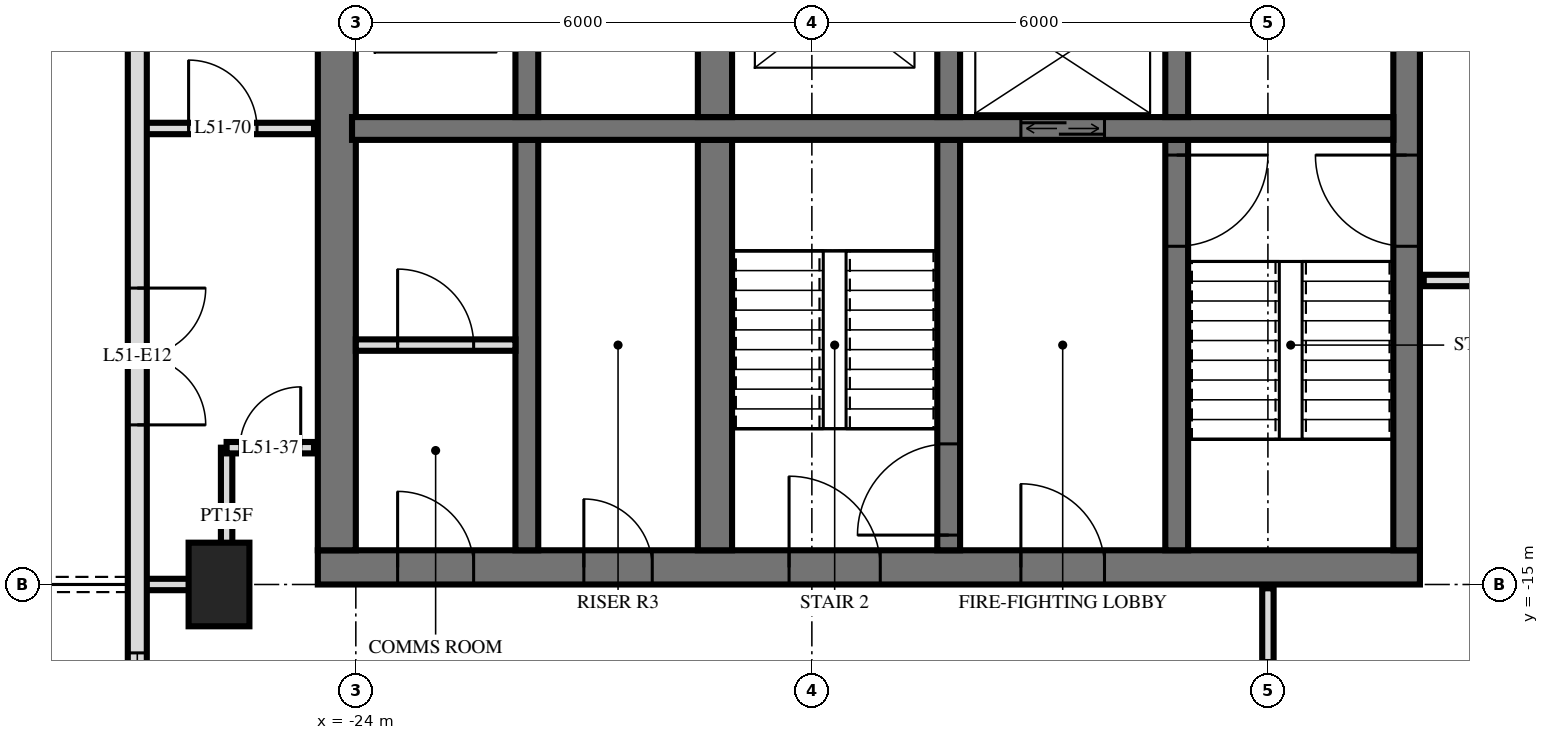
"""IFC4 building model, lengths in metres.
Left out: names, types, materials, properties, quantities, classifications, styles, units other than length and angle.
Written with IfcOpenShell. Run it as: python <this file> out.ifc"""

import sys

from ifc_helpers import new_model, si_unit, direction, frame, frame_2d, origin, origin_2d, place, context, subcontext, project, spatial, rectangle, extrude, element, fill, save


model = new_model("IFC4")
c1 = context("Model", 3, precision=1e-05, world=origin(), true_north=direction((0.0, 1.0)))
c2 = subcontext(c1, "Body", "Model", "MODEL_VIEW")
j1 = project(units=[si_unit("LENGTHUNIT", "METRE"), si_unit("PLANEANGLEUNIT", "RADIAN")], contexts=[c1])
p1 = place(None, origin())
s1 = spatial("IfcSite", under=j1, at=p1, CompositionType="ELEMENT")
p2 = place(p1, origin())
s2 = spatial("IfcBuilding", under=s1, at=p2, CompositionType="ELEMENT")
p3 = place(p2, frame((0.0, 0.0, 197.6)))
s3 = spatial("IfcBuildingStorey", under=s2, at=p3, CompositionType="ELEMENT", Elevation=197.6)
p4 = place(p3, frame((-25.8, -15.0, 0.0), z_axis=(0.0, 0.0, 1.0), x_axis=(0.0, 1.0, 0.0)))
e1 = element("IfcColumn", 1, at=p4, inside=s3, PredefinedType="COLUMN", context=c2, shape_type="SweptSolid", body=[
    extrude(rectangle(XDim=1.1, YDim=0.8, at=origin_2d()), origin(), (0.0, 0.0, 1.0), 3.5),
])
p5 = place(p3, frame((-24.5, -14.775, 0.0), z_axis=(0.0, 0.0, 1.0), x_axis=(1.0, 0.0, 0.0)))
e2 = element("IfcWall", 2, at=p5, inside=s3, PredefinedType="SHEAR", context=c2, shape_type="SweptSolid", body=[
    extrude(rectangle(XDim=14.5, YDim=0.45, at=frame_2d((7.25, 0.0))), origin(), (0.0, 0.0, 1.0), 3.5),
])
p6 = place(p5, frame((6.2, 0.0, 0.0)))
e3 = element("IfcOpeningElement", 3, at=p6, cuts=e2, PredefinedType="OPENING", context=c2, shape_type="SweptSolid", body=[
    extrude(rectangle(XDim=1.2, YDim=2.1, at=frame_2d((0.6, 1.05))), frame((0.0, 0.235, 0.0), z_axis=(0.0, -1.0, 0.0), x_axis=(1.0, 0.0, 0.0)), (0.0, 0.0, 1.0), 0.47),
])
p7 = place(p5, frame((9.25, 0.0, 0.0)))
e4 = element("IfcOpeningElement", 4, at=p7, cuts=e2, PredefinedType="OPENING", context=c2, shape_type="SweptSolid", body=[
    extrude(rectangle(XDim=1.1, YDim=2.1, at=frame_2d((0.55, 1.05))), frame((0.0, 0.235, 0.0), z_axis=(0.0, -1.0, 0.0), x_axis=(1.0, 0.0, 0.0)), (0.0, 0.0, 1.0), 0.47),
])
p8 = place(p5, frame((3.5, 0.0, 0.0)))
e5 = element("IfcOpeningElement", 5, at=p8, cuts=e2, PredefinedType="OPENING", context=c2, shape_type="SweptSolid", body=[
    extrude(rectangle(XDim=0.9, YDim=2.1, at=frame_2d((0.45, 1.05))), frame((0.0, 0.235, 0.0), z_axis=(0.0, -1.0, 0.0), x_axis=(1.0, 0.0, 0.0)), (0.0, 0.0, 1.0), 0.47),
])
p9 = place(p5, frame((1.05, 0.0, 0.0)))
e6 = element("IfcOpeningElement", 6, at=p9, cuts=e2, PredefinedType="OPENING", context=c2, shape_type="SweptSolid", body=[
    extrude(rectangle(XDim=1.0, YDim=2.1, at=frame_2d((0.5, 1.05))), frame((0.0, 0.235, 0.0), z_axis=(0.0, -1.0, 0.0), x_axis=(1.0, 0.0, 0.0)), (0.0, 0.0, 1.0), 0.47),
])
p10 = place(p3, frame((-10.175, -14.55, 0.0), z_axis=(0.0, 0.0, 1.0), x_axis=(0.0, 1.0, 0.0)))
e7 = element("IfcWall", 7, at=p10, inside=s3, PredefinedType="SHEAR", context=c2, shape_type="SweptSolid", body=[
    extrude(rectangle(XDim=14.1, YDim=0.35, at=frame_2d((7.05, 0.0))), origin(), (0.0, 0.0, 1.0), 3.5),
])
p11 = place(p10, frame((8.4, 0.0, 0.0)))
e8 = element("IfcOpeningElement", 8, at=p11, cuts=e7, PredefinedType="OPENING", context=c2, shape_type="SweptSolid", body=[
    extrude(rectangle(XDim=1.4, YDim=2.4, at=frame_2d((0.7, 1.2))), frame((0.0, 0.185, 0.0), z_axis=(0.0, -1.0, 0.0), x_axis=(1.0, 0.0, 0.0)), (0.0, 0.0, 1.0), 0.37),
])
p12 = place(p10, frame((10.0, 0.0, 0.0)))
e9 = element("IfcOpeningElement", 9, at=p12, cuts=e7, PredefinedType="OPENING", context=c2, shape_type="SweptSolid", body=[
    extrude(rectangle(XDim=1.4, YDim=2.4, at=frame_2d((0.7, 1.2))), frame((0.0, 0.185, 0.0), z_axis=(0.0, -1.0, 0.0), x_axis=(1.0, 0.0, 0.0)), (0.0, 0.0, 1.0), 0.37),
])
p13 = place(p10, frame((4.0, 0.0, 0.0)))
e10 = element("IfcOpeningElement", 10, at=p13, cuts=e7, PredefinedType="OPENING", context=c2, shape_type="SweptSolid", body=[
    extrude(rectangle(XDim=1.2, YDim=2.1, at=frame_2d((0.6, 1.05))), frame((0.0, 0.185, 0.0), z_axis=(0.0, -1.0, 0.0), x_axis=(1.0, 0.0, 0.0)), (0.0, 0.0, 1.0), 0.37),
])
p14 = place(p3, frame((-24.25, -14.55, 0.0), z_axis=(0.0, 0.0, 1.0), x_axis=(0.0, 1.0, 0.0)))
e11 = element("IfcWall", 11, at=p14, inside=s3, PredefinedType="SHEAR", context=c2, shape_type="SweptSolid", body=[
    extrude(rectangle(XDim=14.1, YDim=0.5, at=frame_2d((7.05, 0.0))), origin(), (0.0, 0.0, 1.0), 3.5),
])
p15 = place(p3, frame((-24.05, -9.0, 0.0), z_axis=(0.0, 0.0, 1.0), x_axis=(1.0, 0.0, 0.0)))
e12 = element("IfcWall", 12, at=p15, inside=s3, PredefinedType="SHEAR", context=c2, shape_type="SweptSolid", body=[
    extrude(rectangle(XDim=13.7, YDim=0.3, at=frame_2d((6.85, 0.0))), origin(), (0.0, 0.0, 1.0), 3.5),
])
p16 = place(p15, frame((8.8, 0.0, 0.0)))
e13 = element("IfcOpeningElement", 13, at=p16, cuts=e12, PredefinedType="OPENING", context=c2, shape_type="SweptSolid", body=[
    extrude(rectangle(XDim=1.1, YDim=2.1, at=frame_2d((0.55, 1.05))), frame((0.0, 0.16, 0.0), z_axis=(0.0, -1.0, 0.0), x_axis=(1.0, 0.0, 0.0)), (0.0, 0.0, 1.0), 0.32),
])
p17 = place(p3, frame((-13.2, -8.85, 0.0), z_axis=(0.0, 0.0, 1.0), x_axis=(0.0, 1.0, 0.0)))
e14 = element("IfcWall", 14, at=p17, inside=s3, PredefinedType="SHEAR", context=c2, shape_type="SweptSolid", body=[
    extrude(rectangle(XDim=2.3, YDim=0.3, at=frame_2d((1.15, 0.0))), origin(), (0.0, 0.0, 1.0), 3.5),
])
p18 = place(p3, frame((-13.2, -14.55, 0.0), z_axis=(0.0, 0.0, 1.0), x_axis=(0.0, 1.0, 0.0)))
e15 = element("IfcWall", 15, at=p18, inside=s3, PredefinedType="SHEAR", context=c2, shape_type="SweptSolid", body=[
    extrude(rectangle(XDim=5.4, YDim=0.3, at=frame_2d((2.7, 0.0))), origin(), (0.0, 0.0, 1.0), 3.5),
])
p19 = place(p18, frame((4.0, 0.0, 0.0)))
e16 = element("IfcOpeningElement", 16, at=p19, cuts=e15, PredefinedType="OPENING", context=c2, shape_type="SweptSolid", body=[
    extrude(rectangle(XDim=1.2, YDim=2.1, at=frame_2d((0.6, 1.05))), frame((0.0, 0.16, 0.0), z_axis=(0.0, -1.0, 0.0), x_axis=(1.0, 0.0, 0.0)), (0.0, 0.0, 1.0), 0.32),
])
p20 = place(p3, frame((-16.2, -8.85, 0.0), z_axis=(0.0, 0.0, 1.0), x_axis=(0.0, 1.0, 0.0)))
e17 = element("IfcWall", 17, at=p20, inside=s3, PredefinedType="SHEAR", context=c2, shape_type="SweptSolid", body=[
    extrude(rectangle(XDim=2.3, YDim=0.3, at=frame_2d((1.15, 0.0))), origin(), (0.0, 0.0, 1.0), 3.5),
])
p21 = place(p3, frame((-16.2, -14.55, 0.0), z_axis=(0.0, 0.0, 1.0), x_axis=(0.0, 1.0, 0.0)))
e18 = element("IfcWall", 18, at=p21, inside=s3, PredefinedType="SHEAR", context=c2, shape_type="SweptSolid", body=[
    extrude(rectangle(XDim=5.4, YDim=0.3, at=frame_2d((2.7, 0.0))), origin(), (0.0, 0.0, 1.0), 3.5),
])
p22 = place(p21, frame((0.2, 0.0, 0.0)))
e19 = element("IfcOpeningElement", 19, at=p22, cuts=e18, PredefinedType="OPENING", context=c2, shape_type="SweptSolid", body=[
    extrude(rectangle(XDim=1.2, YDim=2.1, at=frame_2d((0.6, 1.05))), frame((0.0, 0.16, 0.0), z_axis=(0.0, -1.0, 0.0), x_axis=(1.0, 0.0, 0.0)), (0.0, 0.0, 1.0), 0.32),
])
p23 = place(p3, frame((-19.275, -8.85, 0.0), z_axis=(0.0, 0.0, 1.0), x_axis=(0.0, 1.0, 0.0)))
e20 = element("IfcWall", 20, at=p23, inside=s3, PredefinedType="SHEAR", context=c2, shape_type="SweptSolid", body=[
    extrude(rectangle(XDim=2.3, YDim=0.45, at=frame_2d((1.15, 0.0))), origin(), (0.0, 0.0, 1.0), 3.5),
])
p24 = place(p3, frame((-19.275, -14.55, 0.0), z_axis=(0.0, 0.0, 1.0), x_axis=(0.0, 1.0, 0.0)))
e21 = element("IfcWall", 21, at=p24, inside=s3, PredefinedType="SHEAR", context=c2, shape_type="SweptSolid", body=[
    extrude(rectangle(XDim=5.4, YDim=0.45, at=frame_2d((2.7, 0.0))), origin(), (0.0, 0.0, 1.0), 3.5),
])
p25 = place(p3, frame((-21.75, -8.85, 0.0), z_axis=(0.0, 0.0, 1.0), x_axis=(0.0, 1.0, 0.0)))
e22 = element("IfcWall", 22, at=p25, inside=s3, PredefinedType="SHEAR", context=c2, shape_type="SweptSolid", body=[
    extrude(rectangle(XDim=2.3, YDim=0.3, at=frame_2d((1.15, 0.0))), origin(), (0.0, 0.0, 1.0), 3.5),
])
p26 = place(p3, frame((-21.75, -14.55, 0.0), z_axis=(0.0, 0.0, 1.0), x_axis=(0.0, 1.0, 0.0)))
e23 = element("IfcWall", 23, at=p26, inside=s3, PredefinedType="SHEAR", context=c2, shape_type="SweptSolid", body=[
    extrude(rectangle(XDim=5.4, YDim=0.3, at=frame_2d((2.7, 0.0))), origin(), (0.0, 0.0, 1.0), 3.5),
])
p27 = place(p3, frame((-26.875, -3.325, 0.0), z_axis=(0.0, 0.0, 1.0), x_axis=(0.0, -1.0, 0.0)))
e24 = element("IfcWall", 24, at=p27, inside=s3, PredefinedType="SOLIDWALL", context=c2, shape_type="SweptSolid", body=[
    extrude(rectangle(XDim=21.551, YDim=0.25, at=frame_2d((10.775, 0.0))), origin(), (0.0, 0.0, 1.0), 3.22),
])
p28 = place(p27, frame((7.775, 0.0, 0.0)))
e25 = element("IfcOpeningElement", 25, at=p28, cuts=e24, PredefinedType="OPENING", context=c2, shape_type="SweptSolid", body=[
    extrude(rectangle(XDim=1.8, YDim=2.4, at=frame_2d((0.9, 1.2))), frame((0.0, 0.135, 0.0), z_axis=(0.0, -1.0, 0.0), x_axis=(1.0, 0.0, 0.0)), (0.0, 0.0, 1.0), 0.27),
])
p29 = place(p27, frame((12.575, 0.0, 0.9)))
e26 = element("IfcOpeningElement", 26, at=p29, cuts=e24, PredefinedType="OPENING", context=c2, shape_type="SweptSolid", body=[
    extrude(rectangle(XDim=1.2, YDim=1.5, at=frame_2d((0.6, 0.75))), frame((0.0, 0.135, 0.0), z_axis=(0.0, -1.0, 0.0), x_axis=(1.0, 0.0, 0.0)), (0.0, 0.0, 1.0), 0.27),
])
p30 = place(p27, frame((15.275, 0.0, 0.0)))
e27 = element("IfcOpeningElement", 27, at=p30, cuts=e24, PredefinedType="OPENING", context=c2, shape_type="SweptSolid", body=[
    extrude(rectangle(XDim=1.8, YDim=2.4, at=frame_2d((0.9, 1.2))), frame((0.0, 0.135, 0.0), z_axis=(0.0, -1.0, 0.0), x_axis=(1.0, 0.0, 0.0)), (0.0, 0.0, 1.0), 0.27),
])
p31 = place(p27, frame((19.325, 0.0, 0.0)))
e28 = element("IfcOpeningElement", 28, at=p31, cuts=e24, PredefinedType="OPENING", context=c2, shape_type="SweptSolid", body=[
    extrude(rectangle(XDim=1.8, YDim=2.4, at=frame_2d((0.9, 1.2))), frame((0.0, 0.135, 0.0), z_axis=(0.0, -1.0, 0.0), x_axis=(1.0, 0.0, 0.0)), (0.0, 0.0, 1.0), 0.27),
])
p32 = place(p3, frame((-24.0, -11.85, 0.0), z_axis=(0.0, 0.0, 1.0), x_axis=(1.0, 0.0, 0.0)))
e29 = element("IfcWall", 29, at=p32, inside=s3, PredefinedType="PARTITIONING", context=c2, shape_type="SweptSolid", body=[
    extrude(rectangle(XDim=2.1, YDim=0.15, at=frame_2d((1.05, 0.0))), origin(), (0.0, 0.0, 1.0), 3.2),
])
p33 = place(p32, frame((0.55, 0.0, 0.0)))
e30 = element("IfcOpeningElement", 30, at=p33, cuts=e29, PredefinedType="OPENING", context=c2, shape_type="SweptSolid", body=[
    extrude(rectangle(XDim=1.0, YDim=2.1, at=frame_2d((0.5, 1.05))), frame((0.0, 0.085, 0.0), z_axis=(0.0, -1.0, 0.0), x_axis=(1.0, 0.0, 0.0)), (0.0, 0.0, 1.0), 0.17),
])
p34 = place(p3, frame((-12.0, -18.0, 0.0), z_axis=(0.0, 0.0, 1.0), x_axis=(0.0, 1.0, 0.0)))
e31 = element("IfcWall", 31, at=p34, inside=s3, PredefinedType="PARTITIONING", context=c2, shape_type="SweptSolid", body=[
    extrude(rectangle(XDim=2.95, YDim=0.15, at=frame_2d((1.475, 0.0))), origin(), (0.0, 0.0, 1.0), 3.22),
])
p35 = place(p34, frame((1.0, 0.0, 0.0)))
e32 = element("IfcOpeningElement", 32, at=p35, cuts=e31, PredefinedType="OPENING", context=c2, shape_type="SweptSolid", body=[
    extrude(rectangle(XDim=1.0, YDim=2.1, at=frame_2d((0.5, 1.05))), frame((0.0, 0.085, 0.0), z_axis=(0.0, -1.0, 0.0), x_axis=(1.0, 0.0, 0.0)), (0.0, 0.0, 1.0), 0.17),
])
p36 = place(p3, frame((-25.7, -15.0, 0.0), z_axis=(0.0, 0.0, 1.0), x_axis=(0.0, 1.0, 0.0)))
e33 = element("IfcWall", 33, at=p36, inside=s3, PredefinedType="PARTITIONING", context=c2, shape_type="SweptSolid", body=[
    extrude(rectangle(XDim=1.8, YDim=0.15, at=frame_2d((0.9, 0.0))), origin(), (0.0, 0.0, 1.0), 3.22),
])
p37 = place(p3, frame((-26.82, -15.0, 0.0), z_axis=(0.0, 0.0, 1.0), x_axis=(1.0, 0.0, 0.0)))
e34 = element("IfcWall", 34, at=p37, inside=s3, PredefinedType="PARTITIONING", context=c2, shape_type="SweptSolid", body=[
    extrude(rectangle(XDim=1.12, YDim=0.15, at=frame_2d((0.56, 0.0))), origin(), (0.0, 0.0, 1.0), 3.22),
])
p38 = place(p3, frame((-25.7, -13.2, 0.0), z_axis=(0.0, 0.0, 1.0), x_axis=(1.0, 0.0, 0.0)))
e35 = element("IfcWall", 35, at=p38, inside=s3, PredefinedType="PARTITIONING", context=c2, shape_type="SweptSolid", body=[
    extrude(rectangle(XDim=1.15, YDim=0.15, at=frame_2d((0.575, 0.0))), origin(), (0.0, 0.0, 1.0), 3.22),
])
p39 = place(p38, frame((0.175, 0.0, 0.0)))
e36 = element("IfcOpeningElement", 36, at=p39, cuts=e35, PredefinedType="OPENING", context=c2, shape_type="SweptSolid", body=[
    extrude(rectangle(XDim=0.8, YDim=2.1, at=frame_2d((0.4, 1.05))), frame((0.0, 0.085, 0.0), z_axis=(0.0, -1.0, 0.0), x_axis=(1.0, 0.0, 0.0)), (0.0, 0.0, 1.0), 0.17),
])
p40 = place(p3, frame((-9.95, -11.0, 0.0), z_axis=(0.0, 0.0, 1.0), x_axis=(1.0, 0.0, 0.0)))
e37 = element("IfcWall", 37, at=p40, inside=s3, PredefinedType="PARTITIONING", context=c2, shape_type="SweptSolid", body=[
    extrude(rectangle(XDim=19.9, YDim=0.15, at=frame_2d((9.95, 0.0))), origin(), (0.0, 0.0, 1.0), 3.22),
])
p41 = place(p40, frame((9.45, 0.0, 0.0)))
e38 = element("IfcOpeningElement", 38, at=p41, cuts=e37, PredefinedType="OPENING", context=c2, shape_type="SweptSolid", body=[
    extrude(rectangle(XDim=1.0, YDim=2.1, at=frame_2d((0.5, 1.05))), frame((0.0, 0.085, 0.0), z_axis=(0.0, -1.0, 0.0), x_axis=(1.0, 0.0, 0.0)), (0.0, 0.0, 1.0), 0.17),
])
p42 = place(p40, frame((3.45, 0.0, 0.0)))
e39 = element("IfcOpeningElement", 39, at=p42, cuts=e37, PredefinedType="OPENING", context=c2, shape_type="SweptSolid", body=[
    extrude(rectangle(XDim=1.0, YDim=2.1, at=frame_2d((0.5, 1.05))), frame((0.0, 0.085, 0.0), z_axis=(0.0, -1.0, 0.0), x_axis=(1.0, 0.0, 0.0)), (0.0, 0.0, 1.0), 0.17),
])
p43 = place(p3, frame((-26.82, -9.0, 0.0), z_axis=(0.0, 0.0, 1.0), x_axis=(1.0, 0.0, 0.0)))
e40 = element("IfcWall", 40, at=p43, inside=s3, PredefinedType="PARTITIONING", context=c2, shape_type="SweptSolid", body=[
    extrude(rectangle(XDim=2.27, YDim=0.15, at=frame_2d((1.135, 0.0))), origin(), (0.0, 0.0, 1.0), 3.22),
])
p44 = place(p43, frame((0.62, 0.0, 0.0)))
e41 = element("IfcOpeningElement", 41, at=p44, cuts=e40, PredefinedType="OPENING", context=c2, shape_type="SweptSolid", body=[
    extrude(rectangle(XDim=0.9, YDim=2.1, at=frame_2d((0.45, 1.05))), frame((0.0, 0.085, 0.0), z_axis=(0.0, -1.0, 0.0), x_axis=(1.0, 0.0, 0.0)), (0.0, 0.0, 1.0), 0.17),
])
p45 = place(p28, origin())
e42 = element("IfcDoor", 42, at=p45, inside=s3, OperationType="DOUBLE_DOOR_SINGLE_SWING", PredefinedType="DOOR", context=c2, shape_type="SweptSolid", body=[
    extrude(rectangle(XDim=1.8, YDim=2.4, at=frame_2d((0.9, 1.2))), frame((0.0, 0.025, 0.0), z_axis=(0.0, -1.0, 0.0), x_axis=(1.0, 0.0, 0.0)), (0.0, 0.0, 1.0), 0.05),
])
fill(e25, e42)
p46 = place(p29, origin())
e43 = element("IfcWindow", 43, at=p46, inside=s3, PartitioningType="SINGLE_PANEL", PredefinedType="WINDOW", context=c2, shape_type="SweptSolid", body=[
    extrude(rectangle(XDim=1.2, YDim=1.5, at=frame_2d((0.6, 0.75))), frame((0.0, 0.03, 0.0), z_axis=(0.0, -1.0, 0.0), x_axis=(1.0, 0.0, 0.0)), (0.0, 0.0, 1.0), 0.06),
])
fill(e26, e43)
p47 = place(p16, origin())
e44 = element("IfcDoor", 44, at=p47, inside=s3, OperationType="DOUBLE_DOOR_SLIDING", PredefinedType="USERDEFINED", context=c2, shape_type="SweptSolid", body=[
    extrude(rectangle(XDim=1.1, YDim=2.1, at=frame_2d((0.55, 1.05))), frame((0.0, 0.025, 0.0), z_axis=(0.0, -1.0, 0.0), x_axis=(1.0, 0.0, 0.0)), (0.0, 0.0, 1.0), 0.05),
])
fill(e13, e44)
p48 = place(p13, origin())
e45 = element("IfcDoor", 45, at=p48, inside=s3, OperationType="SINGLE_SWING_LEFT", PredefinedType="DOOR", context=c2, shape_type="SweptSolid", body=[
    extrude(rectangle(XDim=1.2, YDim=2.1, at=frame_2d((0.6, 1.05))), frame((0.0, 0.025, 0.0), z_axis=(0.0, -1.0, 0.0), x_axis=(1.0, 0.0, 0.0)), (0.0, 0.0, 1.0), 0.05),
])
fill(e10, e45)
p49 = place(p6, origin())
e46 = element("IfcDoor", 46, at=p49, inside=s3, OperationType="SINGLE_SWING_RIGHT", PredefinedType="DOOR", context=c2, shape_type="SweptSolid", body=[
    extrude(rectangle(XDim=1.2, YDim=2.1, at=frame_2d((0.6, 1.05))), frame((0.0, 0.025, 0.0), z_axis=(0.0, -1.0, 0.0), x_axis=(1.0, 0.0, 0.0)), (0.0, 0.0, 1.0), 0.05),
])
fill(e3, e46)
p50 = place(p7, origin())
e47 = element("IfcDoor", 47, at=p50, inside=s3, OperationType="SINGLE_SWING_RIGHT", PredefinedType="DOOR", context=c2, shape_type="SweptSolid", body=[
    extrude(rectangle(XDim=1.1, YDim=2.1, at=frame_2d((0.55, 1.05))), frame((0.0, 0.025, 0.0), z_axis=(0.0, -1.0, 0.0), x_axis=(1.0, 0.0, 0.0)), (0.0, 0.0, 1.0), 0.05),
])
fill(e4, e47)
p51 = place(p8, origin())
e48 = element("IfcDoor", 48, at=p51, inside=s3, OperationType="SINGLE_SWING_RIGHT", PredefinedType="DOOR", context=c2, shape_type="SweptSolid", body=[
    extrude(rectangle(XDim=0.9, YDim=2.1, at=frame_2d((0.45, 1.05))), frame((0.0, 0.025, 0.0), z_axis=(0.0, -1.0, 0.0), x_axis=(1.0, 0.0, 0.0)), (0.0, 0.0, 1.0), 0.05),
])
fill(e5, e48)
p52 = place(p9, origin())
e49 = element("IfcDoor", 49, at=p52, inside=s3, OperationType="SINGLE_SWING_RIGHT", PredefinedType="DOOR", context=c2, shape_type="SweptSolid", body=[
    extrude(rectangle(XDim=1.0, YDim=2.1, at=frame_2d((0.5, 1.05))), frame((0.0, 0.025, 0.0), z_axis=(0.0, -1.0, 0.0), x_axis=(1.0, 0.0, 0.0)), (0.0, 0.0, 1.0), 0.05),
])
fill(e6, e49)
p53 = place(p19, frame((0.6, 0.0, 0.0), z_axis=(0.0, 0.0, 1.0), x_axis=(-1.0, 0.0, 0.0)))
e50 = element("IfcDoor", 50, at=p53, inside=s3, OperationType="SINGLE_SWING_RIGHT", PredefinedType="DOOR", context=c2, shape_type="SweptSolid", body=[
    extrude(rectangle(XDim=1.2, YDim=2.1, at=frame_2d((0.0, 1.05))), frame((0.0, -0.025, 0.0), z_axis=(0.0, 1.0, 0.0), x_axis=(-1.0, 0.0, 0.0)), (0.0, 0.0, 1.0), 0.05),
])
fill(e16, e50)
p54 = place(p22, origin())
e51 = element("IfcDoor", 51, at=p54, inside=s3, OperationType="SINGLE_SWING_RIGHT", PredefinedType="DOOR", context=c2, shape_type="SweptSolid", body=[
    extrude(rectangle(XDim=1.2, YDim=2.1, at=frame_2d((0.6, 1.05))), frame((0.0, 0.025, 0.0), z_axis=(0.0, -1.0, 0.0), x_axis=(1.0, 0.0, 0.0)), (0.0, 0.0, 1.0), 0.05),
])
fill(e19, e51)
p55 = place(p33, origin())
e52 = element("IfcDoor", 52, at=p55, inside=s3, OperationType="SINGLE_SWING_RIGHT", PredefinedType="DOOR", context=c2, shape_type="SweptSolid", body=[
    extrude(rectangle(XDim=1.0, YDim=2.1, at=frame_2d((0.5, 1.05))), frame((0.0, 0.025, 0.0), z_axis=(0.0, -1.0, 0.0), x_axis=(1.0, 0.0, 0.0)), (0.0, 0.0, 1.0), 0.05),
])
fill(e30, e52)
p56 = place(p39, origin())
e53 = element("IfcDoor", 53, at=p56, inside=s3, OperationType="SINGLE_SWING_LEFT", PredefinedType="DOOR", context=c2, shape_type="SweptSolid", body=[
    extrude(rectangle(XDim=0.8, YDim=2.1, at=frame_2d((0.4, 1.05))), frame((0.0, 0.025, 0.0), z_axis=(0.0, -1.0, 0.0), x_axis=(1.0, 0.0, 0.0)), (0.0, 0.0, 1.0), 0.05),
])
fill(e36, e53)
p57 = place(p44, origin())
e54 = element("IfcDoor", 54, at=p57, inside=s3, OperationType="SINGLE_SWING_RIGHT", PredefinedType="DOOR", context=c2, shape_type="SweptSolid", body=[
    extrude(rectangle(XDim=0.9, YDim=2.1, at=frame_2d((0.45, 1.05))), frame((0.0, 0.025, 0.0), z_axis=(0.0, -1.0, 0.0), x_axis=(1.0, 0.0, 0.0)), (0.0, 0.0, 1.0), 0.05),
])
fill(e41, e54)
save(model, sys.argv[1])
